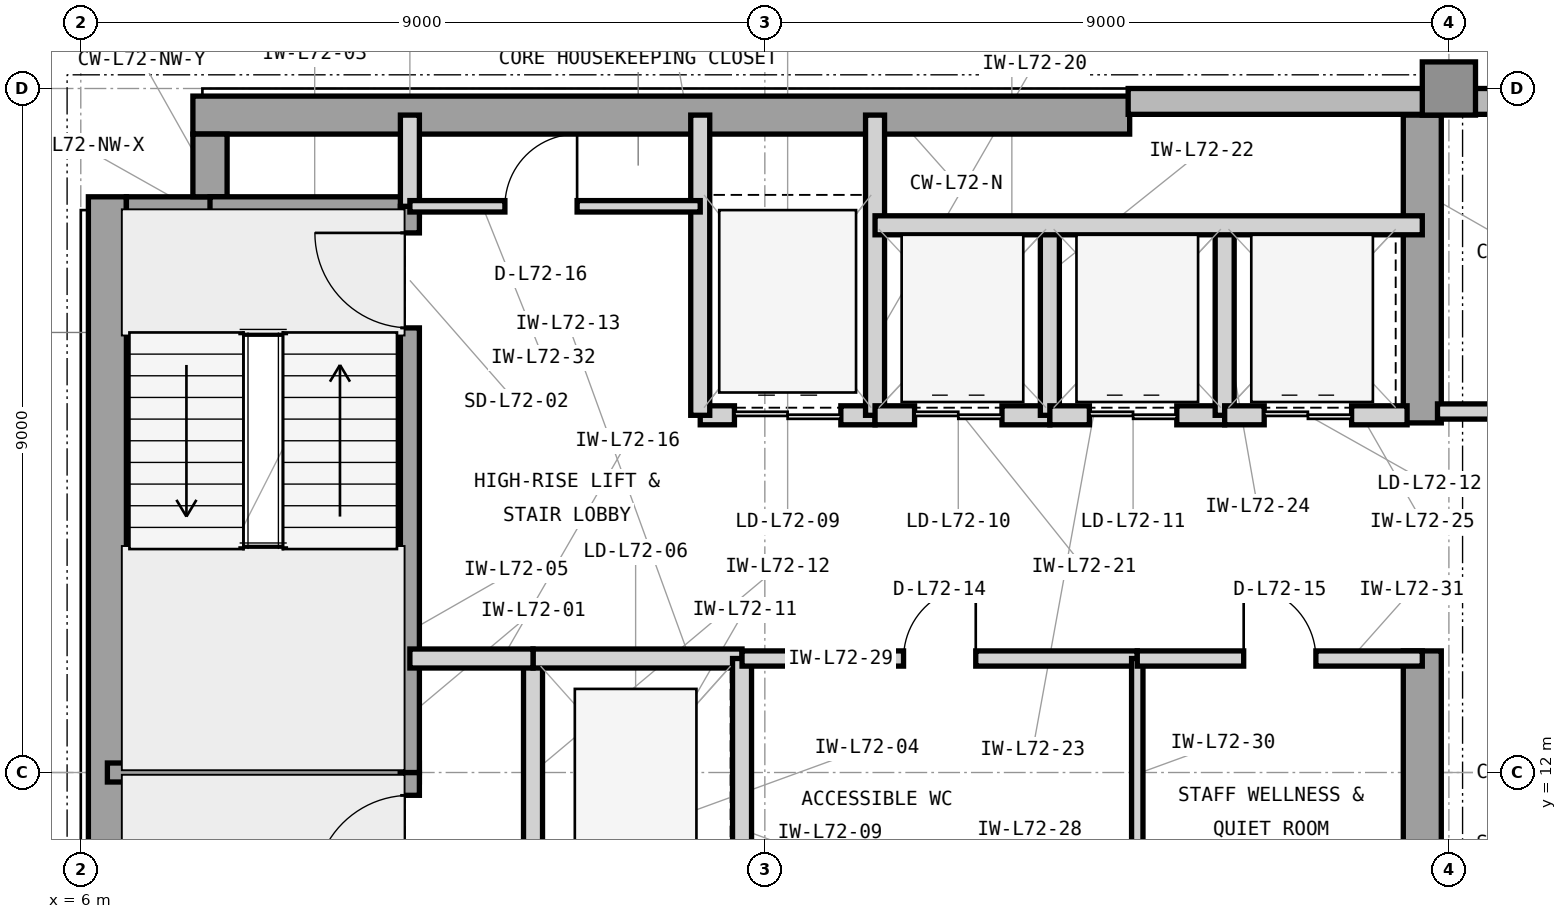
"""IFC4 building model, lengths in metres.
Left out: names, types, materials, properties, quantities, classifications, styles, units other than length and angle.
Written with IfcOpenShell. Run it as: python <this file> out.ifc"""

import sys

from ifc_helpers import new_model, si_unit, direction, frame, frame_2d, origin, origin_2d, place, context, subcontext, project, spatial, rectangle, extrude, element, fill, save


model = new_model("IFC4")
c1 = context("Model", 3, precision=1e-05, world=origin(), true_north=direction((0.0, 1.0)))
c2 = subcontext(c1, "Body", "Model", "MODEL_VIEW")
j1 = project(units=[si_unit("LENGTHUNIT", "METRE"), si_unit("PLANEANGLEUNIT", "RADIAN")], contexts=[c1])
p1 = place(None, origin())
s1 = spatial("IfcSite", under=j1, at=p1, CompositionType="ELEMENT")
p2 = place(p1, origin())
s2 = spatial("IfcBuilding", under=s1, at=p2, CompositionType="ELEMENT")
p3 = place(p2, frame((0.0, 0.0, 293.7)))
s3 = spatial("IfcBuildingStorey", under=s2, at=p3, CompositionType="ELEMENT", Elevation=293.7)
p4 = place(p3, frame((6.35, 4.425, 0.0), z_axis=(0.0, 0.0, 1.0), x_axis=(0.0, 1.0, 0.0)))
e1 = element("IfcWall", 1, at=p4, inside=s3, PredefinedType="SHEAR", context=c2, shape_type="SweptSolid", body=[
    extrude(rectangle(XDim=15.15, YDim=0.5, at=frame_2d((7.575, 0.0))), origin(), (0.0, 0.0, 1.0), 3.9),
])
p5 = place(p3, frame((7.475, 20.65, 0.0), z_axis=(0.0, 0.0, 1.0), x_axis=(1.0, 0.0, 0.0)))
e2 = element("IfcWall", 2, at=p5, inside=s3, PredefinedType="SHEAR", context=c2, shape_type="SweptSolid", body=[
    extrude(rectangle(XDim=12.325, YDim=0.5, at=frame_2d((6.163, 0.0))), origin(), (0.0, 0.0, 1.0), 3.9),
])
p6 = place(p3, frame((23.65, 10.4, 0.0), z_axis=(0.0, 0.0, 1.0), x_axis=(0.0, 1.0, 0.0)))
e3 = element("IfcWall", 3, at=p6, inside=s3, PredefinedType="SHEAR", context=c2, shape_type="SweptSolid", body=[
    extrude(rectangle(XDim=3.2, YDim=0.5, at=frame_2d((1.6, 0.0))), origin(), (0.0, 0.0, 1.0), 3.9),
])
p7 = place(p3, frame((23.65, 16.6, 0.0), z_axis=(0.0, 0.0, 1.0), x_axis=(0.0, 1.0, 0.0)))
e4 = element("IfcWall", 4, at=p7, inside=s3, PredefinedType="SHEAR", context=c2, shape_type="SweptSolid", body=[
    extrude(rectangle(XDim=4.05, YDim=0.5, at=frame_2d((2.025, 0.0))), origin(), (0.0, 0.0, 1.0), 3.9),
])
p8 = place(p3, frame((6.6, 19.35, 0.0), z_axis=(0.0, 0.0, 1.0), x_axis=(1.0, 0.0, 0.0)))
e5 = element("IfcWall", 5, at=p8, inside=s3, PredefinedType="SHEAR", context=c2, shape_type="SweptSolid", body=[
    extrude(rectangle(XDim=1.325, YDim=0.45, at=frame_2d((0.663, 0.0))), origin(), (0.0, 0.0, 1.0), 3.9),
])
p9 = place(p3, frame((7.7, 19.575, 0.0), z_axis=(0.0, 0.0, 1.0), x_axis=(0.0, 1.0, 0.0)))
e6 = element("IfcWall", 6, at=p9, inside=s3, PredefinedType="SHEAR", context=c2, shape_type="SweptSolid", body=[
    extrude(rectangle(XDim=0.825, YDim=0.45, at=frame_2d((0.413, 0.0))), origin(), (0.0, 0.0, 1.0), 3.9),
])
p10 = place(p3, frame((24.0, 21.0, 0.0), z_axis=(0.0, 0.0, 1.0), x_axis=(1.0, 0.0, 0.0)))
e7 = element("IfcColumn", 7, at=p10, inside=s3, PredefinedType="COLUMN", context=c2, shape_type="SweptSolid", body=[
    extrude(rectangle(XDim=0.7, YDim=0.7, at=origin_2d()), origin(), (0.0, 0.0, 1.0), 3.9),
])
p11 = place(p3, frame((49.4, 20.83, 0.0), z_axis=(0.0, 0.0, 1.0), x_axis=(-1.0, 0.0, 0.0)))
e8 = element("IfcWall", 8, at=p11, inside=s3, PredefinedType="STANDARD", context=c2, shape_type="SweptSolid", body=[
    extrude(rectangle(XDim=29.62, YDim=0.34, at=frame_2d((14.81, 0.0))), origin(), (0.0, 0.0, 1.0), 3.715),
])
p12 = place(p11, frame((22.826, 0.0, 0.8)))
e9 = element("IfcOpeningElement", 9, at=p12, cuts=e8, PredefinedType="OPENING", context=c2, shape_type="SweptSolid", body=[
    extrude(rectangle(XDim=1.9, YDim=2.35, at=frame_2d((0.95, 1.175))), frame((0.0, 0.18, 0.0), z_axis=(0.0, -1.0, 0.0), x_axis=(1.0, 0.0, 0.0)), (0.0, 0.0, 1.0), 0.36),
])
p13 = place(p11, frame((12.825, 0.0, 0.8)))
e10 = element("IfcOpeningElement", 10, at=p13, cuts=e8, PredefinedType="OPENING", context=c2, shape_type="SweptSolid", body=[
    extrude(rectangle(XDim=2.6, YDim=2.35, at=frame_2d((1.3, 1.175))), frame((0.0, 0.18, 0.0), z_axis=(0.0, -1.0, 0.0), x_axis=(1.0, 0.0, 0.0)), (0.0, 0.0, 1.0), 0.36),
])
p14 = place(p11, frame((8.375, 0.0, 0.8)))
e11 = element("IfcOpeningElement", 11, at=p14, cuts=e8, PredefinedType="OPENING", context=c2, shape_type="SweptSolid", body=[
    extrude(rectangle(XDim=2.6, YDim=2.35, at=frame_2d((1.3, 1.175))), frame((0.0, 0.18, 0.0), z_axis=(0.0, -1.0, 0.0), x_axis=(1.0, 0.0, 0.0)), (0.0, 0.0, 1.0), 0.36),
])
p15 = place(p3, frame((6.35, 12.0, 0.0), z_axis=(0.0, 0.0, 1.0), x_axis=(1.0, 0.0, 0.0)))
e12 = element("IfcWall", 12, at=p15, inside=s3, PredefinedType="SHEAR", context=c2, shape_type="SweptSolid", body=[
    extrude(rectangle(XDim=4.105, YDim=0.25, at=frame_2d((2.052, 0.0))), origin(), (0.0, 0.0, 1.0), 3.9),
])
p16 = place(p3, frame((7.7, 19.45, 0.0), z_axis=(0.0, 0.0, 1.0), x_axis=(1.0, 0.0, 0.0)))
e13 = element("IfcWall", 13, at=p16, inside=s3, PredefinedType="SHEAR", context=c2, shape_type="SweptSolid", body=[
    extrude(rectangle(XDim=2.755, YDim=0.25, at=frame_2d((1.377, 0.0))), origin(), (0.0, 0.0, 1.0), 3.9),
])
p17 = place(p3, frame((10.33, 4.55, 0.0), z_axis=(0.0, 0.0, 1.0), x_axis=(0.0, 1.0, 0.0)))
e14 = element("IfcWall", 14, at=p17, inside=s3, PredefinedType="SHEAR", context=c2, shape_type="SweptSolid", body=[
    extrude(rectangle(XDim=7.45, YDim=0.25, at=frame_2d((3.725, 0.0))), origin(), (0.0, 0.0, 1.0), 3.9),
])
p18 = place(p17, frame((5.9, 0.0, 0.0)))
e15 = element("IfcOpeningElement", 15, at=p18, cuts=e14, PredefinedType="OPENING", context=c2, shape_type="SweptSolid", body=[
    extrude(rectangle(XDim=1.25, YDim=2.2, at=frame_2d((0.625, 1.1))), frame((0.0, 0.135, 0.0), z_axis=(0.0, -1.0, 0.0), x_axis=(1.0, 0.0, 0.0)), (0.0, 0.0, 1.0), 0.27),
])
p19 = place(p3, frame((10.33, 12.0, 0.0), z_axis=(0.0, 0.0, 1.0), x_axis=(0.0, 1.0, 0.0)))
e16 = element("IfcWall", 16, at=p19, inside=s3, PredefinedType="SHEAR", context=c2, shape_type="SweptSolid", body=[
    extrude(rectangle(XDim=7.45, YDim=0.25, at=frame_2d((3.725, 0.0))), origin(), (0.0, 0.0, 1.0), 3.9),
])
p20 = place(p19, frame((5.85, 0.0, 0.0)))
e17 = element("IfcOpeningElement", 17, at=p20, cuts=e16, PredefinedType="OPENING", context=c2, shape_type="SweptSolid", body=[
    extrude(rectangle(XDim=1.25, YDim=2.2, at=frame_2d((0.625, 1.1))), frame((0.0, 0.135, 0.0), z_axis=(0.0, -1.0, 0.0), x_axis=(1.0, 0.0, 0.0)), (0.0, 0.0, 1.0), 0.27),
])
p21 = place(p3, frame((10.33, 19.45, 0.0), z_axis=(0.0, 0.0, 1.0), x_axis=(0.0, 1.0, 0.0)))
e18 = element("IfcWall", 18, at=p21, inside=s3, PredefinedType="PARTITIONING", context=c2, shape_type="SweptSolid", body=[
    extrude(rectangle(XDim=1.2, YDim=0.25, at=frame_2d((0.6, 0.0))), origin(), (0.0, 0.0, 1.0), 3.705),
])
p22 = place(p3, frame((11.95, 10.5, 0.0), z_axis=(0.0, 0.0, 1.0), x_axis=(0.0, 1.0, 0.0)))
e19 = element("IfcWall", 19, at=p22, inside=s3, PredefinedType="PARTITIONING", context=c2, shape_type="SweptSolid", body=[
    extrude(rectangle(XDim=3.0, YDim=0.25, at=frame_2d((1.5, 0.0))), origin(), (0.0, 0.0, 1.0), 3.705),
])
p23 = place(p3, frame((11.95, 13.5, 0.0), z_axis=(0.0, 0.0, 1.0), x_axis=(1.0, 0.0, 0.0)))
e20 = element("IfcWall", 20, at=p23, inside=s3, PredefinedType="PARTITIONING", context=c2, shape_type="SweptSolid", body=[
    extrude(rectangle(XDim=2.75, YDim=0.25, at=frame_2d((1.375, 0.0))), origin(), (0.0, 0.0, 1.0), 3.354),
])
p24 = place(p3, frame((14.7, 10.5, 0.0), z_axis=(0.0, 0.0, 1.0), x_axis=(0.0, 1.0, 0.0)))
e21 = element("IfcWall", 21, at=p24, inside=s3, PredefinedType="PARTITIONING", context=c2, shape_type="SweptSolid", body=[
    extrude(rectangle(XDim=3.0, YDim=0.25, at=frame_2d((1.5, 0.0))), origin(), (0.0, 0.0, 1.0), 3.705),
])
p25 = place(p3, frame((10.33, 13.5, 0.0), z_axis=(0.0, 0.0, 1.0), x_axis=(1.0, 0.0, 0.0)))
e22 = element("IfcWall", 22, at=p25, inside=s3, PredefinedType="PARTITIONING", context=c2, shape_type="SweptSolid", body=[
    extrude(rectangle(XDim=1.62, YDim=0.25, at=frame_2d((0.81, 0.0))), origin(), (0.0, 0.0, 1.0), 3.354),
])
p26 = place(p3, frame((14.15, 16.7, 0.0), z_axis=(0.0, 0.0, 1.0), x_axis=(1.0, 0.0, 0.0)))
e23 = element("IfcWall", 23, at=p26, inside=s3, PredefinedType="PARTITIONING", context=c2, shape_type="SweptSolid", body=[
    extrude(rectangle(XDim=2.3, YDim=0.25, at=frame_2d((1.15, 0.0))), origin(), (0.0, 0.0, 1.0), 3.354),
])
p27 = place(p26, frame((0.45, 0.0, 0.0)))
e24 = element("IfcOpeningElement", 24, at=p27, cuts=e23, PredefinedType="OPENING", context=c2, shape_type="SweptSolid", body=[
    extrude(rectangle(XDim=1.4, YDim=2.35, at=frame_2d((0.7, 1.175))), frame((0.0, 0.135, 0.0), z_axis=(0.0, -1.0, 0.0), x_axis=(1.0, 0.0, 0.0)), (0.0, 0.0, 1.0), 0.27),
])
for number, where, z_axis, x_axis in (
    (25, (14.15, 16.7, 0.0), (0.0, 0.0, 1.0), (0.0, 1.0, 0.0)),
    (26, (16.45, 16.7, 0.0), (0.0, 0.0, 1.0), (0.0, 1.0, 0.0)),
):
    element("IfcWall", number, at=place(p3, frame(where, z_axis=z_axis, x_axis=x_axis)), inside=s3, PredefinedType="PARTITIONING", context=c2, shape_type="SweptSolid", body=[
        extrude(rectangle(XDim=3.95, YDim=0.25, at=frame_2d((1.975, 0.0))), origin(), (0.0, 0.0, 1.0), 3.705),
    ])
p28 = place(p3, frame((16.45, 16.7, 0.0), z_axis=(0.0, 0.0, 1.0), x_axis=(1.0, 0.0, 0.0)))
e27 = element("IfcWall", 27, at=p28, inside=s3, PredefinedType="PARTITIONING", context=c2, shape_type="SweptSolid", body=[
    extrude(rectangle(XDim=2.3, YDim=0.25, at=frame_2d((1.15, 0.0))), origin(), (0.0, 0.0, 1.0), 3.354),
])
p29 = place(p28, frame((0.52, 0.0, 0.0)))
e28 = element("IfcOpeningElement", 28, at=p29, cuts=e27, PredefinedType="OPENING", context=c2, shape_type="SweptSolid", body=[
    extrude(rectangle(XDim=1.15, YDim=2.25, at=frame_2d((0.575, 1.125))), frame((0.0, 0.135, 0.0), z_axis=(0.0, -1.0, 0.0), x_axis=(1.0, 0.0, 0.0)), (0.0, 0.0, 1.0), 0.27),
])
p30 = place(p3, frame((18.75, 16.7, 0.0), z_axis=(0.0, 0.0, 1.0), x_axis=(0.0, 1.0, 0.0)))
e29 = element("IfcWall", 29, at=p30, inside=s3, PredefinedType="PARTITIONING", context=c2, shape_type="SweptSolid", body=[
    extrude(rectangle(XDim=2.5, YDim=0.25, at=frame_2d((1.25, 0.0))), origin(), (0.0, 0.0, 1.0), 3.705),
])
p31 = place(p3, frame((18.75, 16.7, 0.0), z_axis=(0.0, 0.0, 1.0), x_axis=(1.0, 0.0, 0.0)))
e30 = element("IfcWall", 30, at=p31, inside=s3, PredefinedType="PARTITIONING", context=c2, shape_type="SweptSolid", body=[
    extrude(rectangle(XDim=2.3, YDim=0.25, at=frame_2d((1.15, 0.0))), origin(), (0.0, 0.0, 1.0), 3.354),
])
p32 = place(p31, frame((0.52, 0.0, 0.0)))
e31 = element("IfcOpeningElement", 31, at=p32, cuts=e30, PredefinedType="OPENING", context=c2, shape_type="SweptSolid", body=[
    extrude(rectangle(XDim=1.15, YDim=2.25, at=frame_2d((0.575, 1.125))), frame((0.0, 0.135, 0.0), z_axis=(0.0, -1.0, 0.0), x_axis=(1.0, 0.0, 0.0)), (0.0, 0.0, 1.0), 0.27),
])
p33 = place(p3, frame((21.05, 16.7, 0.0), z_axis=(0.0, 0.0, 1.0), x_axis=(0.0, 1.0, 0.0)))
e32 = element("IfcWall", 32, at=p33, inside=s3, PredefinedType="PARTITIONING", context=c2, shape_type="SweptSolid", body=[
    extrude(rectangle(XDim=2.5, YDim=0.25, at=frame_2d((1.25, 0.0))), origin(), (0.0, 0.0, 1.0), 3.705),
])
p34 = place(p3, frame((21.05, 16.7, 0.0), z_axis=(0.0, 0.0, 1.0), x_axis=(1.0, 0.0, 0.0)))
e33 = element("IfcWall", 33, at=p34, inside=s3, PredefinedType="PARTITIONING", context=c2, shape_type="SweptSolid", body=[
    extrude(rectangle(XDim=2.4, YDim=0.25, at=frame_2d((1.2, 0.0))), origin(), (0.0, 0.0, 1.0), 3.354),
])
p35 = place(p34, frame((0.52, 0.0, 0.0)))
e34 = element("IfcOpeningElement", 34, at=p35, cuts=e33, PredefinedType="OPENING", context=c2, shape_type="SweptSolid", body=[
    extrude(rectangle(XDim=1.15, YDim=2.25, at=frame_2d((0.575, 1.125))), frame((0.0, 0.135, 0.0), z_axis=(0.0, -1.0, 0.0), x_axis=(1.0, 0.0, 0.0)), (0.0, 0.0, 1.0), 0.27),
])
p36 = place(p3, frame((16.45, 19.2, 0.0), z_axis=(0.0, 0.0, 1.0), x_axis=(1.0, 0.0, 0.0)))
e35 = element("IfcWall", 35, at=p36, inside=s3, PredefinedType="PARTITIONING", context=c2, shape_type="SweptSolid", body=[
    extrude(rectangle(XDim=7.2, YDim=0.25, at=frame_2d((3.6, 0.0))), origin(), (0.0, 0.0, 1.0), 3.705),
])
p37 = place(p3, frame((14.7, 13.5, 0.0), z_axis=(0.0, 0.0, 1.0), x_axis=(1.0, 0.0, 0.0)))
e36 = element("IfcWall", 36, at=p37, inside=s3, PredefinedType="PARTITIONING", context=c2, shape_type="SweptSolid", body=[
    extrude(rectangle(XDim=5.2, YDim=0.2, at=frame_2d((2.6, 0.0))), origin(), (0.0, 0.0, 1.0), 3.354),
])
p38 = place(p37, frame((2.125, 0.0, 0.0)))
e37 = element("IfcOpeningElement", 37, at=p38, cuts=e36, PredefinedType="OPENING", context=c2, shape_type="SweptSolid", body=[
    extrude(rectangle(XDim=0.95, YDim=2.1, at=frame_2d((0.475, 1.05))), frame((0.0, 0.11, 0.0), z_axis=(0.0, -1.0, 0.0), x_axis=(1.0, 0.0, 0.0)), (0.0, 0.0, 1.0), 0.22),
])
p39 = place(p3, frame((19.9, 10.465, 0.0), z_axis=(0.0, 0.0, 1.0), x_axis=(0.0, 1.0, 0.0)))
e38 = element("IfcWall", 38, at=p39, inside=s3, PredefinedType="PARTITIONING", context=c2, shape_type="SweptSolid", body=[
    extrude(rectangle(XDim=3.035, YDim=0.15, at=frame_2d((1.518, 0.0))), origin(), (0.0, 0.0, 1.0), 3.705),
])
p40 = place(p3, frame((19.9, 13.5, 0.0), z_axis=(0.0, 0.0, 1.0), x_axis=(1.0, 0.0, 0.0)))
e39 = element("IfcWall", 39, at=p40, inside=s3, PredefinedType="PARTITIONING", context=c2, shape_type="SweptSolid", body=[
    extrude(rectangle(XDim=3.75, YDim=0.2, at=frame_2d((1.875, 0.0))), origin(), (0.0, 0.0, 1.0), 3.354),
])
p41 = place(p40, frame((1.4, 0.0, 0.0)))
e40 = element("IfcOpeningElement", 40, at=p41, cuts=e39, PredefinedType="OPENING", context=c2, shape_type="SweptSolid", body=[
    extrude(rectangle(XDim=0.95, YDim=2.1, at=frame_2d((0.475, 1.05))), frame((0.0, 0.11, 0.0), z_axis=(0.0, -1.0, 0.0), x_axis=(1.0, 0.0, 0.0)), (0.0, 0.0, 1.0), 0.22),
])
p42 = place(p3, frame((10.33, 19.45, 0.0), z_axis=(0.0, 0.0, 1.0), x_axis=(1.0, 0.0, 0.0)))
e41 = element("IfcWall", 41, at=p42, inside=s3, PredefinedType="PARTITIONING", context=c2, shape_type="SweptSolid", body=[
    extrude(rectangle(XDim=3.82, YDim=0.15, at=frame_2d((1.91, 0.0))), origin(), (0.0, 0.0, 1.0), 3.705),
])
p43 = place(p42, frame((1.25, 0.0, 0.0)))
e42 = element("IfcOpeningElement", 42, at=p43, cuts=e41, PredefinedType="OPENING", context=c2, shape_type="SweptSolid", body=[
    extrude(rectangle(XDim=0.95, YDim=2.1, at=frame_2d((0.475, 1.05))), frame((0.0, 0.085, 0.0), z_axis=(0.0, -1.0, 0.0), x_axis=(1.0, 0.0, 0.0)), (0.0, 0.0, 1.0), 0.17),
])
p44 = place(p3, frame((23.85, 16.75, 0.0), z_axis=(0.0, 0.0, 1.0), x_axis=(1.0, 0.0, 0.0)))
e43 = element("IfcWall", 43, at=p44, inside=s3, PredefinedType="PARTITIONING", context=c2, shape_type="SweptSolid", body=[
    extrude(rectangle(XDim=3.05, YDim=0.2, at=frame_2d((1.525, 0.0))), origin(), (0.0, 0.0, 1.0), 3.705),
])
p45 = place(p44, frame((0.9, 0.0, 0.0)))
e44 = element("IfcOpeningElement", 44, at=p45, cuts=e43, PredefinedType="OPENING", context=c2, shape_type="SweptSolid", body=[
    extrude(rectangle(XDim=1.0, YDim=2.15, at=frame_2d((0.5, 1.075))), frame((0.0, 0.11, 0.0), z_axis=(0.0, -1.0, 0.0), x_axis=(1.0, 0.0, 0.0)), (0.0, 0.0, 1.0), 0.22),
])
p46 = place(p18, origin())
e45 = element("IfcDoor", 45, at=p46, inside=s3, OperationType="SINGLE_SWING_LEFT", PredefinedType="DOOR", context=c2, shape_type="SweptSolid", body=[
    extrude(rectangle(XDim=1.25, YDim=2.2, at=frame_2d((0.625, 1.1))), frame((0.0, 0.025, 0.0), z_axis=(0.0, -1.0, 0.0), x_axis=(1.0, 0.0, 0.0)), (0.0, 0.0, 1.0), 0.05),
])
fill(e15, e45)
p47 = place(p20, origin())
e46 = element("IfcDoor", 46, at=p47, inside=s3, OperationType="SINGLE_SWING_RIGHT", PredefinedType="DOOR", context=c2, shape_type="SweptSolid", body=[
    extrude(rectangle(XDim=1.25, YDim=2.2, at=frame_2d((0.625, 1.1))), frame((0.0, 0.025, 0.0), z_axis=(0.0, -1.0, 0.0), x_axis=(1.0, 0.0, 0.0)), (0.0, 0.0, 1.0), 0.05),
])
fill(e17, e46)
p48 = place(p27, origin())
e47 = element("IfcDoor", 47, at=p48, inside=s3, OperationType="DOUBLE_DOOR_SLIDING", PredefinedType="DOOR", context=c2, shape_type="SweptSolid", body=[
    extrude(rectangle(XDim=1.4, YDim=2.35, at=frame_2d((0.7, 1.175))), frame((0.0, 0.025, 0.0), z_axis=(0.0, -1.0, 0.0), x_axis=(1.0, 0.0, 0.0)), (0.0, 0.0, 1.0), 0.05),
])
fill(e24, e47)
p49 = place(p29, origin())
e48 = element("IfcDoor", 48, at=p49, inside=s3, OperationType="DOUBLE_DOOR_SLIDING", PredefinedType="DOOR", context=c2, shape_type="SweptSolid", body=[
    extrude(rectangle(XDim=1.15, YDim=2.25, at=frame_2d((0.575, 1.125))), frame((0.0, 0.025, 0.0), z_axis=(0.0, -1.0, 0.0), x_axis=(1.0, 0.0, 0.0)), (0.0, 0.0, 1.0), 0.05),
])
fill(e28, e48)
p50 = place(p32, origin())
e49 = element("IfcDoor", 49, at=p50, inside=s3, OperationType="DOUBLE_DOOR_SLIDING", PredefinedType="DOOR", context=c2, shape_type="SweptSolid", body=[
    extrude(rectangle(XDim=1.15, YDim=2.25, at=frame_2d((0.575, 1.125))), frame((0.0, 0.025, 0.0), z_axis=(0.0, -1.0, 0.0), x_axis=(1.0, 0.0, 0.0)), (0.0, 0.0, 1.0), 0.05),
])
fill(e31, e49)
p51 = place(p35, origin())
e50 = element("IfcDoor", 50, at=p51, inside=s3, OperationType="DOUBLE_DOOR_SLIDING", PredefinedType="DOOR", context=c2, shape_type="SweptSolid", body=[
    extrude(rectangle(XDim=1.15, YDim=2.25, at=frame_2d((0.575, 1.125))), frame((0.0, 0.025, 0.0), z_axis=(0.0, -1.0, 0.0), x_axis=(1.0, 0.0, 0.0)), (0.0, 0.0, 1.0), 0.05),
])
fill(e34, e50)
p52 = place(p38, origin())
e51 = element("IfcDoor", 51, at=p52, inside=s3, OperationType="SINGLE_SWING_RIGHT", PredefinedType="DOOR", context=c2, shape_type="SweptSolid", body=[
    extrude(rectangle(XDim=0.95, YDim=2.1, at=frame_2d((0.475, 1.05))), frame((0.0, 0.025, 0.0), z_axis=(0.0, -1.0, 0.0), x_axis=(1.0, 0.0, 0.0)), (0.0, 0.0, 1.0), 0.05),
])
fill(e37, e51)
p53 = place(p41, origin())
e52 = element("IfcDoor", 52, at=p53, inside=s3, OperationType="SINGLE_SWING_LEFT", PredefinedType="DOOR", context=c2, shape_type="SweptSolid", body=[
    extrude(rectangle(XDim=0.95, YDim=2.1, at=frame_2d((0.475, 1.05))), frame((0.0, 0.025, 0.0), z_axis=(0.0, -1.0, 0.0), x_axis=(1.0, 0.0, 0.0)), (0.0, 0.0, 1.0), 0.05),
])
fill(e40, e52)
p54 = place(p43, origin())
e53 = element("IfcDoor", 53, at=p54, inside=s3, OperationType="SINGLE_SWING_RIGHT", PredefinedType="DOOR", context=c2, shape_type="SweptSolid", body=[
    extrude(rectangle(XDim=0.95, YDim=2.1, at=frame_2d((0.475, 1.05))), frame((0.0, 0.025, 0.0), z_axis=(0.0, -1.0, 0.0), x_axis=(1.0, 0.0, 0.0)), (0.0, 0.0, 1.0), 0.05),
])
fill(e42, e53)
save(model, sys.argv[1])
